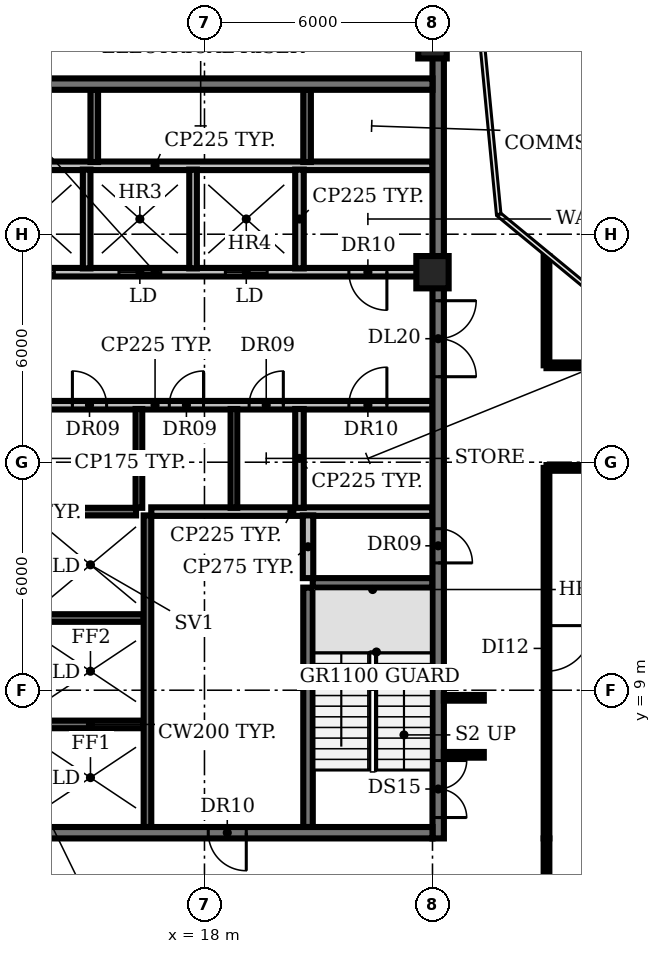
"""IFC4 building model, lengths in metres.
Left out: names, types, materials, properties, quantities, classifications, styles, units other than length and angle.
Written with IfcOpenShell. Run it as: python <this file> out.ifc"""

import sys

from ifc_helpers import new_model, si_unit, direction, frame, frame_2d, origin, origin_2d, place, context, subcontext, project, spatial, rectangle, circle, extrude, element, fill, save


model = new_model("IFC4")
c1 = context("Model", 3, precision=1e-05, world=origin(), true_north=direction((0.0, 1.0)))
c2 = subcontext(c1, "Body", "Model", "MODEL_VIEW")
j1 = project(units=[si_unit("LENGTHUNIT", "METRE"), si_unit("PLANEANGLEUNIT", "RADIAN")], contexts=[c1])
p1 = place(None, origin())
s1 = spatial("IfcSite", under=j1, at=p1, CompositionType="ELEMENT")
p2 = place(p1, origin())
s2 = spatial("IfcBuilding", under=s1, at=p2, CompositionType="ELEMENT")
p3 = place(p2, frame((0.0, 0.0, 310.4)))
s3 = spatial("IfcBuildingStorey", under=s2, at=p3, CompositionType="ELEMENT", Elevation=310.4)
p4 = place(p3, frame((24.0, 20.0, 0.0), z_axis=(0.0, 0.0, 1.0), x_axis=(1.0, 0.0, 0.0)))
e1 = element("IfcColumn", 1, at=p4, inside=s3, PredefinedType="COLUMN", context=c2, shape_type="SweptSolid", body=[
    extrude(circle(Radius=0.425, at=origin_2d()), origin(), (0.0, 0.0, 1.0), 3.9),
])
p5 = place(p3, frame((24.0, 26.0, 0.0), z_axis=(0.0, 0.0, 1.0), x_axis=(1.0, 0.0, 0.0)))
e2 = element("IfcColumn", 2, at=p5, inside=s3, PredefinedType="COLUMN", context=c2, shape_type="SweptSolid", body=[
    extrude(rectangle(XDim=0.75, YDim=0.75, at=origin_2d()), origin(), (0.0, 0.0, 1.0), 3.9),
])
for number, where, z_axis, x_axis in (
    (3, (13.6, 8.1, 0.0), (0.0, 0.0, 1.0), (1.0, 0.0, 0.0)),
    (4, (13.6, 10.9, 0.0), (0.0, 0.0, 1.0), (1.0, 0.0, 0.0)),
):
    element("IfcWall", number, at=place(p3, frame(where, z_axis=z_axis, x_axis=x_axis)), inside=s3, PredefinedType="SHEAR", context=c2, shape_type="SweptSolid", body=[
        extrude(rectangle(XDim=2.8, YDim=0.2, at=frame_2d((1.4, 0.0))), origin(), (0.0, 0.0, 1.0), 3.9),
    ])
p6 = place(p3, frame((20.85, 11.825, 0.0), z_axis=(0.0, 0.0, 1.0), x_axis=(1.0, 0.0, 0.0)))
e5 = element("IfcWall", 5, at=p6, inside=s3, PredefinedType="SHEAR", context=c2, shape_type="SweptSolid", body=[
    extrude(rectangle(XDim=3.15, YDim=0.25, at=frame_2d((1.575, 0.0))), origin(), (0.0, 0.0, 1.0), 3.9),
])
p7 = place(p3, frame((13.75, 13.7, 0.0), z_axis=(0.0, 0.0, 1.0), x_axis=(1.0, 0.0, 0.0)))
e6 = element("IfcWall", 6, at=p7, inside=s3, PredefinedType="SHEAR", context=c2, shape_type="SweptSolid", body=[
    extrude(rectangle(XDim=2.45, YDim=0.2, at=frame_2d((1.225, 0.0))), origin(), (0.0, 0.0, 1.0), 3.9),
])
p8 = place(p3, frame((16.6, 13.7, 0.0), z_axis=(0.0, 0.0, 1.0), x_axis=(1.0, 0.0, 0.0)))
e7 = element("IfcWall", 7, at=p8, inside=s3, PredefinedType="PARTITIONING", context=c2, shape_type="SweptSolid", body=[
    extrude(rectangle(XDim=7.4, YDim=0.225, at=frame_2d((3.7, 0.0))), origin(), (0.0, 0.0, 1.0), 3.9),
])
p9 = place(p3, frame((9.4, 16.5, 0.0), z_axis=(0.0, 0.0, 1.0), x_axis=(1.0, 0.0, 0.0)))
e8 = element("IfcWall", 8, at=p9, inside=s3, PredefinedType="PARTITIONING", context=c2, shape_type="SweptSolid", body=[
    extrude(rectangle(XDim=14.6, YDim=0.225, at=frame_2d((7.3, 0.0))), origin(), (0.0, 0.0, 1.0), 3.9),
])
p10 = place(p9, frame((1.6, 0.0, 0.0)))
e9 = element("IfcOpeningElement", 9, at=p10, cuts=e8, PredefinedType="OPENING", context=c2, shape_type="SweptSolid", body=[
    extrude(rectangle(XDim=1.0, YDim=2.1, at=frame_2d((0.5, 1.05))), frame((0.0, 0.123, 0.0), z_axis=(0.0, -1.0, 0.0), x_axis=(1.0, 0.0, 0.0)), (0.0, 0.0, 1.0), 0.245),
])
p11 = place(p9, frame((5.125, 0.0, 0.0)))
e10 = element("IfcOpeningElement", 10, at=p11, cuts=e8, PredefinedType="OPENING", context=c2, shape_type="SweptSolid", body=[
    extrude(rectangle(XDim=0.9, YDim=2.1, at=frame_2d((0.45, 1.05))), frame((0.0, 0.123, 0.0), z_axis=(0.0, -1.0, 0.0), x_axis=(1.0, 0.0, 0.0)), (0.0, 0.0, 1.0), 0.245),
])
p12 = place(p9, frame((7.675, 0.0, 0.0)))
e11 = element("IfcOpeningElement", 11, at=p12, cuts=e8, PredefinedType="OPENING", context=c2, shape_type="SweptSolid", body=[
    extrude(rectangle(XDim=0.9, YDim=2.1, at=frame_2d((0.45, 1.05))), frame((0.0, 0.123, 0.0), z_axis=(0.0, -1.0, 0.0), x_axis=(1.0, 0.0, 0.0)), (0.0, 0.0, 1.0), 0.245),
])
p13 = place(p9, frame((9.775, 0.0, 0.0)))
e12 = element("IfcOpeningElement", 12, at=p13, cuts=e8, PredefinedType="OPENING", context=c2, shape_type="SweptSolid", body=[
    extrude(rectangle(XDim=0.9, YDim=2.1, at=frame_2d((0.45, 1.05))), frame((0.0, 0.123, 0.0), z_axis=(0.0, -1.0, 0.0), x_axis=(1.0, 0.0, 0.0)), (0.0, 0.0, 1.0), 0.245),
])
p14 = place(p9, frame((12.4, 0.0, 0.0)))
e13 = element("IfcOpeningElement", 13, at=p14, cuts=e8, PredefinedType="OPENING", context=c2, shape_type="SweptSolid", body=[
    extrude(rectangle(XDim=1.0, YDim=2.1, at=frame_2d((0.5, 1.05))), frame((0.0, 0.123, 0.0), z_axis=(0.0, -1.0, 0.0), x_axis=(1.0, 0.0, 0.0)), (0.0, 0.0, 1.0), 0.245),
])
p15 = place(p3, frame((24.0, 20.0, 0.0), z_axis=(0.0, 0.0, 1.0), x_axis=(-1.0, 0.0, 0.0)))
e14 = element("IfcWall", 14, at=p15, inside=s3, PredefinedType="PARTITIONING", context=c2, shape_type="SweptSolid", body=[
    extrude(rectangle(XDim=14.6, YDim=0.225, at=frame_2d((7.3, 0.0))), origin(), (0.0, 0.0, 1.0), 3.9),
])
p16 = place(p15, frame((12.75, 0.0, 0.0)))
e15 = element("IfcOpeningElement", 15, at=p16, cuts=e14, PredefinedType="OPENING", context=c2, shape_type="SweptSolid", body=[
    extrude(rectangle(XDim=1.1, YDim=2.1, at=frame_2d((0.55, 1.05))), frame((0.0, 0.123, 0.0), z_axis=(0.0, -1.0, 0.0), x_axis=(1.0, 0.0, 0.0)), (0.0, 0.0, 1.0), 0.245),
])
p17 = place(p15, frame((9.95, 0.0, 0.0)))
e16 = element("IfcOpeningElement", 16, at=p17, cuts=e14, PredefinedType="OPENING", context=c2, shape_type="SweptSolid", body=[
    extrude(rectangle(XDim=1.1, YDim=2.1, at=frame_2d((0.55, 1.05))), frame((0.0, 0.123, 0.0), z_axis=(0.0, -1.0, 0.0), x_axis=(1.0, 0.0, 0.0)), (0.0, 0.0, 1.0), 0.245),
])
p18 = place(p15, frame((7.15, 0.0, 0.0)))
e17 = element("IfcOpeningElement", 17, at=p18, cuts=e14, PredefinedType="OPENING", context=c2, shape_type="SweptSolid", body=[
    extrude(rectangle(XDim=1.1, YDim=2.1, at=frame_2d((0.55, 1.05))), frame((0.0, 0.123, 0.0), z_axis=(0.0, -1.0, 0.0), x_axis=(1.0, 0.0, 0.0)), (0.0, 0.0, 1.0), 0.245),
])
p19 = place(p15, frame((4.35, 0.0, 0.0)))
e18 = element("IfcOpeningElement", 18, at=p19, cuts=e14, PredefinedType="OPENING", context=c2, shape_type="SweptSolid", body=[
    extrude(rectangle(XDim=1.1, YDim=2.1, at=frame_2d((0.55, 1.05))), frame((0.0, 0.123, 0.0), z_axis=(0.0, -1.0, 0.0), x_axis=(1.0, 0.0, 0.0)), (0.0, 0.0, 1.0), 0.245),
])
p20 = place(p15, frame((1.2, 0.0, 0.0)))
e19 = element("IfcOpeningElement", 19, at=p20, cuts=e14, PredefinedType="OPENING", context=c2, shape_type="SweptSolid", body=[
    extrude(rectangle(XDim=1.0, YDim=2.1, at=frame_2d((0.5, 1.05))), frame((0.0, 0.123, 0.0), z_axis=(0.0, -1.0, 0.0), x_axis=(1.0, 0.0, 0.0)), (0.0, 0.0, 1.0), 0.245),
])
p21 = place(p3, frame((9.4, 22.8, 0.0), z_axis=(0.0, 0.0, 1.0), x_axis=(1.0, 0.0, 0.0)))
e20 = element("IfcWall", 20, at=p21, inside=s3, PredefinedType="PARTITIONING", context=c2, shape_type="SweptSolid", body=[
    extrude(rectangle(XDim=14.6, YDim=0.225, at=frame_2d((7.3, 0.0))), origin(), (0.0, 0.0, 1.0), 3.9),
])
p22 = place(p3, frame((14.9, 20.1, 0.0), z_axis=(0.0, 0.0, 1.0), x_axis=(0.0, 1.0, 0.0)))
e21 = element("IfcWall", 21, at=p22, inside=s3, PredefinedType="SOLIDWALL", context=c2, shape_type="SweptSolid", body=[
    extrude(rectangle(XDim=2.6, YDim=0.2, at=frame_2d((1.3, 0.0))), origin(), (0.0, 0.0, 1.0), 3.9),
])
p23 = place(p3, frame((15.1, 22.9, 0.0), z_axis=(0.0, 0.0, 1.0), x_axis=(0.0, 1.0, 0.0)))
e22 = element("IfcWall", 22, at=p23, inside=s3, PredefinedType="SHEAR", context=c2, shape_type="SweptSolid", body=[
    extrude(rectangle(XDim=1.9, YDim=0.2, at=frame_2d((0.95, 0.0))), origin(), (0.0, 0.0, 1.0), 3.9),
])
p24 = place(p3, frame((16.275, 13.8, 0.0), z_axis=(0.0, 0.0, 1.0), x_axis=(0.0, 1.0, 0.0)))
e23 = element("IfcWall", 23, at=p24, inside=s3, PredefinedType="PARTITIONING", context=c2, shape_type="SweptSolid", body=[
    extrude(rectangle(XDim=2.6, YDim=0.175, at=frame_2d((1.3, 0.0))), origin(), (0.0, 0.0, 1.0), 3.9),
])
p25 = place(p3, frame((16.5, 5.4, 0.0), z_axis=(0.0, 0.0, 1.0), x_axis=(0.0, 1.0, 0.0)))
e24 = element("IfcWall", 24, at=p25, inside=s3, PredefinedType="SHEAR", context=c2, shape_type="SweptSolid", body=[
    extrude(rectangle(XDim=8.2, YDim=0.2, at=frame_2d((4.1, 0.0))), origin(), (0.0, 0.0, 1.0), 3.9),
])
p26 = place(p3, frame((17.7, 20.1, 0.0), z_axis=(0.0, 0.0, 1.0), x_axis=(0.0, 1.0, 0.0)))
e25 = element("IfcWall", 25, at=p26, inside=s3, PredefinedType="SOLIDWALL", context=c2, shape_type="SweptSolid", body=[
    extrude(rectangle(XDim=2.6, YDim=0.2, at=frame_2d((1.3, 0.0))), origin(), (0.0, 0.0, 1.0), 3.9),
])
p27 = place(p3, frame((18.775, 13.8, 0.0), z_axis=(0.0, 0.0, 1.0), x_axis=(0.0, 1.0, 0.0)))
e26 = element("IfcWall", 26, at=p27, inside=s3, PredefinedType="PARTITIONING", context=c2, shape_type="SweptSolid", body=[
    extrude(rectangle(XDim=2.6, YDim=0.175, at=frame_2d((1.3, 0.0))), origin(), (0.0, 0.0, 1.0), 3.9),
])
for number, where, z_axis, x_axis in (
    (27, (20.5, 13.8, 0.0), (0.0, 0.0, 1.0), (0.0, 1.0, 0.0)),
    (28, (20.5, 20.1, 0.0), (0.0, 0.0, 1.0), (0.0, 1.0, 0.0)),
):
    element("IfcWall", number, at=place(p3, frame(where, z_axis=z_axis, x_axis=x_axis)), inside=s3, PredefinedType="PARTITIONING", context=c2, shape_type="SweptSolid", body=[
        extrude(rectangle(XDim=2.6, YDim=0.225, at=frame_2d((1.3, 0.0))), origin(), (0.0, 0.0, 1.0), 3.9),
    ])
p28 = place(p3, frame((20.7, 22.9, 0.0), z_axis=(0.0, 0.0, 1.0), x_axis=(0.0, 1.0, 0.0)))
e29 = element("IfcWall", 29, at=p28, inside=s3, PredefinedType="SHEAR", context=c2, shape_type="SweptSolid", body=[
    extrude(rectangle(XDim=1.9, YDim=0.2, at=frame_2d((0.95, 0.0))), origin(), (0.0, 0.0, 1.0), 3.9),
])
p29 = place(p3, frame((20.725, 5.4, 0.0), z_axis=(0.0, 0.0, 1.0), x_axis=(0.0, 1.0, 0.0)))
e30 = element("IfcWall", 30, at=p29, inside=s3, PredefinedType="SHEAR", context=c2, shape_type="SweptSolid", body=[
    extrude(rectangle(XDim=6.3, YDim=0.25, at=frame_2d((3.15, 0.0))), origin(), (0.0, 0.0, 1.0), 3.9),
])
p30 = place(p3, frame((20.725, 11.95, 0.0), z_axis=(0.0, 0.0, 1.0), x_axis=(0.0, 1.0, 0.0)))
e31 = element("IfcWall", 31, at=p30, inside=s3, PredefinedType="PARTITIONING", context=c2, shape_type="SweptSolid", body=[
    extrude(rectangle(XDim=1.65, YDim=0.275, at=frame_2d((0.825, 0.0))), origin(), (0.0, 0.0, 1.0), 3.9),
])
p31 = place(p3, frame((24.15, 25.655, 0.0), z_axis=(0.0, 0.0, 1.0), x_axis=(0.0, -1.0, 0.0)))
e32 = element("IfcWall", 32, at=p31, inside=s3, PredefinedType="SHEAR", context=c2, shape_type="SweptSolid", body=[
    extrude(rectangle(XDim=20.555, YDim=0.3, at=frame_2d((10.277, 0.0))), origin(), (0.0, 0.0, 1.0), 3.9),
])
p32 = place(p31, frame((18.505, 0.0, 0.0)))
e33 = element("IfcOpeningElement", 33, at=p32, cuts=e32, PredefinedType="OPENING", context=c2, shape_type="SweptSolid", body=[
    extrude(rectangle(XDim=1.5, YDim=2.1, at=frame_2d((0.75, 1.05))), frame((0.0, 0.16, 0.0), z_axis=(0.0, -1.0, 0.0), x_axis=(1.0, 0.0, 0.0)), (0.0, 0.0, 1.0), 0.32),
])
p33 = place(p31, frame((12.405, 0.0, 0.0)))
e34 = element("IfcOpeningElement", 34, at=p33, cuts=e32, PredefinedType="OPENING", context=c2, shape_type="SweptSolid", body=[
    extrude(rectangle(XDim=0.9, YDim=2.1, at=frame_2d((0.45, 1.05))), frame((0.0, 0.16, 0.0), z_axis=(0.0, -1.0, 0.0), x_axis=(1.0, 0.0, 0.0)), (0.0, 0.0, 1.0), 0.32),
])
p34 = place(p31, frame((6.405, 0.0, 0.0)))
e35 = element("IfcOpeningElement", 35, at=p34, cuts=e32, PredefinedType="OPENING", context=c2, shape_type="SweptSolid", body=[
    extrude(rectangle(XDim=2.0, YDim=2.1, at=frame_2d((1.0, 1.05))), frame((0.0, 0.16, 0.0), z_axis=(0.0, -1.0, 0.0), x_axis=(1.0, 0.0, 0.0)), (0.0, 0.0, 1.0), 0.32),
])
p35 = place(p3, frame((24.0, 5.25, 0.0), z_axis=(0.0, 0.0, 1.0), x_axis=(-1.0, 0.0, 0.0)))
e36 = element("IfcWall", 36, at=p35, inside=s3, PredefinedType="SHEAR", context=c2, shape_type="SweptSolid", body=[
    extrude(rectangle(XDim=18.0, YDim=0.3, at=frame_2d((9.0, 0.0))), origin(), (0.0, 0.0, 1.0), 3.9),
])
p36 = place(p35, frame((13.0, 0.0, 0.0)))
e37 = element("IfcOpeningElement", 37, at=p36, cuts=e36, PredefinedType="OPENING", context=c2, shape_type="SweptSolid", body=[
    extrude(rectangle(XDim=1.2, YDim=2.1, at=frame_2d((0.6, 1.05))), frame((0.0, 0.16, 0.0), z_axis=(0.0, -1.0, 0.0), x_axis=(1.0, 0.0, 0.0)), (0.0, 0.0, 1.0), 0.32),
])
p37 = place(p35, frame((4.9, 0.0, 0.0)))
e38 = element("IfcOpeningElement", 38, at=p37, cuts=e36, PredefinedType="OPENING", context=c2, shape_type="SweptSolid", body=[
    extrude(rectangle(XDim=1.0, YDim=2.1, at=frame_2d((0.5, 1.05))), frame((0.0, 0.16, 0.0), z_axis=(0.0, -1.0, 0.0), x_axis=(1.0, 0.0, 0.0)), (0.0, 0.0, 1.0), 0.32),
])
p38 = place(p3, frame((6.0, 24.95, 0.0), z_axis=(0.0, 0.0, 1.0), x_axis=(1.0, 0.0, 0.0)))
e39 = element("IfcWall", 39, at=p38, inside=s3, PredefinedType="SHEAR", context=c2, shape_type="SweptSolid", body=[
    extrude(rectangle(XDim=18.0, YDim=0.3, at=frame_2d((9.0, 0.0))), origin(), (0.0, 0.0, 1.0), 3.9),
])
for number, where, z_axis, x_axis in (
    (40, (24.3, 7.3, 0.0), (0.0, 0.0, 1.0), (1.0, 0.0, 0.0)),
    (41, (24.3, 8.8, 0.0), (0.0, 0.0, 1.0), (1.0, 0.0, 0.0)),
):
    element("IfcWall", number, at=place(p3, frame(where, z_axis=z_axis, x_axis=x_axis)), inside=s3, PredefinedType="PARTITIONING", context=c2, shape_type="SweptSolid", body=[
        extrude(rectangle(XDim=1.05, YDim=0.15, at=frame_2d((0.525, 0.0))), origin(), (0.0, 0.0, 1.0), 2.48),
    ])
p39 = place(p3, frame((27.0, 1.2, 0.0), z_axis=(0.0, 0.0, 1.0), x_axis=(0.0, 1.0, 0.0)))
e42 = element("IfcWall", 42, at=p39, inside=s3, PredefinedType="PARTITIONING", context=c2, shape_type="SweptSolid", body=[
    extrude(rectangle(XDim=3.9, YDim=0.15, at=frame_2d((1.95, 0.0))), origin(), (0.0, 0.0, 1.0), 2.48),
])
p40 = place(p3, frame((27.0, 14.85, 0.0), z_axis=(0.0, 0.0, 1.0), x_axis=(0.0, -1.0, 0.0)))
e43 = element("IfcWall", 43, at=p40, inside=s3, PredefinedType="PARTITIONING", context=c2, shape_type="SweptSolid", body=[
    extrude(rectangle(XDim=9.75, YDim=0.15, at=frame_2d((4.875, 0.0))), origin(), (0.0, 0.0, 1.0), 2.48),
])
p41 = place(p40, frame((4.15, 0.0, 0.0)))
e44 = element("IfcOpeningElement", 44, at=p41, cuts=e43, PredefinedType="OPENING", context=c2, shape_type="SweptSolid", body=[
    extrude(rectangle(XDim=1.2, YDim=2.1, at=frame_2d((0.6, 1.05))), frame((0.0, 0.085, 0.0), z_axis=(0.0, -1.0, 0.0), x_axis=(1.0, 0.0, 0.0)), (0.0, 0.0, 1.0), 0.17),
])
p42 = place(p3, frame((27.0, 14.85, 0.0), z_axis=(0.0, 0.0, 1.0), x_axis=(1.0, 0.0, 0.0)))
e45 = element("IfcWall", 45, at=p42, inside=s3, PredefinedType="PARTITIONING", context=c2, shape_type="SweptSolid", body=[
    extrude(rectangle(XDim=5.473, YDim=0.15, at=frame_2d((2.736, 0.0))), origin(), (0.0, 0.0, 1.0), 2.48),
])
p43 = place(p3, frame((27.0, 17.55, 0.0), z_axis=(0.0, 0.0, 1.0), x_axis=(0.0, 1.0, 0.0)))
e46 = element("IfcWall", 46, at=p43, inside=s3, PredefinedType="PARTITIONING", context=c2, shape_type="SweptSolid", body=[
    extrude(rectangle(XDim=2.87, YDim=0.15, at=frame_2d((1.435, 0.0))), origin(), (0.0, 0.0, 1.0), 2.48),
])
p44 = place(p3, frame((27.0, 17.55, 0.0), z_axis=(0.0, 0.0, 1.0), x_axis=(1.0, 0.0, 0.0)))
e47 = element("IfcWall", 47, at=p44, inside=s3, PredefinedType="PARTITIONING", context=c2, shape_type="SweptSolid", body=[
    extrude(rectangle(XDim=3.48, YDim=0.15, at=frame_2d((1.74, 0.0))), origin(), (0.0, 0.0, 1.0), 2.48),
])
p45 = place(p11, origin())
e48 = element("IfcDoor", 48, at=p45, inside=s3, OperationType="SINGLE_SWING_LEFT", PredefinedType="DOOR", context=c2, shape_type="SweptSolid", body=[
    extrude(rectangle(XDim=0.9, YDim=2.1, at=frame_2d((0.45, 1.05))), frame((0.0, 0.025, 0.0), z_axis=(0.0, -1.0, 0.0), x_axis=(1.0, 0.0, 0.0)), (0.0, 0.0, 1.0), 0.05),
])
fill(e10, e48)
p46 = place(p12, origin())
e49 = element("IfcDoor", 49, at=p46, inside=s3, OperationType="SINGLE_SWING_RIGHT", PredefinedType="DOOR", context=c2, shape_type="SweptSolid", body=[
    extrude(rectangle(XDim=0.9, YDim=2.1, at=frame_2d((0.45, 1.05))), frame((0.0, 0.025, 0.0), z_axis=(0.0, -1.0, 0.0), x_axis=(1.0, 0.0, 0.0)), (0.0, 0.0, 1.0), 0.05),
])
fill(e11, e49)
p47 = place(p13, origin())
e50 = element("IfcDoor", 50, at=p47, inside=s3, OperationType="SINGLE_SWING_RIGHT", PredefinedType="DOOR", context=c2, shape_type="SweptSolid", body=[
    extrude(rectangle(XDim=0.9, YDim=2.1, at=frame_2d((0.45, 1.05))), frame((0.0, 0.025, 0.0), z_axis=(0.0, -1.0, 0.0), x_axis=(1.0, 0.0, 0.0)), (0.0, 0.0, 1.0), 0.05),
])
fill(e12, e50)
p48 = place(p14, origin())
e51 = element("IfcDoor", 51, at=p48, inside=s3, OperationType="SINGLE_SWING_RIGHT", PredefinedType="DOOR", context=c2, shape_type="SweptSolid", body=[
    extrude(rectangle(XDim=1.0, YDim=2.1, at=frame_2d((0.5, 1.05))), frame((0.0, 0.025, 0.0), z_axis=(0.0, -1.0, 0.0), x_axis=(1.0, 0.0, 0.0)), (0.0, 0.0, 1.0), 0.05),
])
fill(e13, e51)
p49 = place(p17, origin())
e52 = element("IfcDoor", 52, at=p49, inside=s3, OperationType="DOUBLE_DOOR_SLIDING", PredefinedType="DOOR", context=c2, shape_type="SweptSolid", body=[
    extrude(rectangle(XDim=1.1, YDim=2.1, at=frame_2d((0.55, 1.05))), frame((0.0, 0.025, 0.0), z_axis=(0.0, -1.0, 0.0), x_axis=(1.0, 0.0, 0.0)), (0.0, 0.0, 1.0), 0.05),
])
fill(e16, e52)
p50 = place(p18, origin())
e53 = element("IfcDoor", 53, at=p50, inside=s3, OperationType="DOUBLE_DOOR_SLIDING", PredefinedType="DOOR", context=c2, shape_type="SweptSolid", body=[
    extrude(rectangle(XDim=1.1, YDim=2.1, at=frame_2d((0.55, 1.05))), frame((0.0, 0.025, 0.0), z_axis=(0.0, -1.0, 0.0), x_axis=(1.0, 0.0, 0.0)), (0.0, 0.0, 1.0), 0.05),
])
fill(e17, e53)
p51 = place(p19, origin())
e54 = element("IfcDoor", 54, at=p51, inside=s3, OperationType="DOUBLE_DOOR_SLIDING", PredefinedType="DOOR", context=c2, shape_type="SweptSolid", body=[
    extrude(rectangle(XDim=1.1, YDim=2.1, at=frame_2d((0.55, 1.05))), frame((0.0, 0.025, 0.0), z_axis=(0.0, -1.0, 0.0), x_axis=(1.0, 0.0, 0.0)), (0.0, 0.0, 1.0), 0.05),
])
fill(e18, e54)
p52 = place(p20, origin())
e55 = element("IfcDoor", 55, at=p52, inside=s3, OperationType="SINGLE_SWING_LEFT", PredefinedType="DOOR", context=c2, shape_type="SweptSolid", body=[
    extrude(rectangle(XDim=1.0, YDim=2.1, at=frame_2d((0.5, 1.05))), frame((0.0, 0.025, 0.0), z_axis=(0.0, -1.0, 0.0), x_axis=(1.0, 0.0, 0.0)), (0.0, 0.0, 1.0), 0.05),
])
fill(e19, e55)
p53 = place(p32, origin())
e56 = element("IfcDoor", 56, at=p53, inside=s3, OperationType="DOUBLE_DOOR_SINGLE_SWING", PredefinedType="DOOR", context=c2, shape_type="SweptSolid", body=[
    extrude(rectangle(XDim=1.5, YDim=2.1, at=frame_2d((0.75, 1.05))), frame((0.0, 0.025, 0.0), z_axis=(0.0, -1.0, 0.0), x_axis=(1.0, 0.0, 0.0)), (0.0, 0.0, 1.0), 0.05),
])
fill(e33, e56)
p54 = place(p33, origin())
e57 = element("IfcDoor", 57, at=p54, inside=s3, OperationType="SINGLE_SWING_RIGHT", PredefinedType="DOOR", context=c2, shape_type="SweptSolid", body=[
    extrude(rectangle(XDim=0.9, YDim=2.1, at=frame_2d((0.45, 1.05))), frame((0.0, 0.025, 0.0), z_axis=(0.0, -1.0, 0.0), x_axis=(1.0, 0.0, 0.0)), (0.0, 0.0, 1.0), 0.05),
])
fill(e34, e57)
p55 = place(p34, origin())
e58 = element("IfcDoor", 58, at=p55, inside=s3, OperationType="DOUBLE_DOOR_SINGLE_SWING", PredefinedType="DOOR", context=c2, shape_type="SweptSolid", body=[
    extrude(rectangle(XDim=2.0, YDim=2.1, at=frame_2d((1.0, 1.05))), frame((0.0, 0.025, 0.0), z_axis=(0.0, -1.0, 0.0), x_axis=(1.0, 0.0, 0.0)), (0.0, 0.0, 1.0), 0.05),
])
fill(e35, e58)
p56 = place(p37, origin())
e59 = element("IfcDoor", 59, at=p56, inside=s3, OperationType="SINGLE_SWING_LEFT", PredefinedType="DOOR", context=c2, shape_type="SweptSolid", body=[
    extrude(rectangle(XDim=1.0, YDim=2.1, at=frame_2d((0.5, 1.05))), frame((0.0, 0.025, 0.0), z_axis=(0.0, -1.0, 0.0), x_axis=(1.0, 0.0, 0.0)), (0.0, 0.0, 1.0), 0.05),
])
fill(e38, e59)
p57 = place(p41, origin())
e60 = element("IfcDoor", 60, at=p57, inside=s3, OperationType="SINGLE_SWING_LEFT", PredefinedType="DOOR", context=c2, shape_type="SweptSolid", body=[
    extrude(rectangle(XDim=1.2, YDim=2.1, at=frame_2d((0.6, 1.05))), frame((0.0, 0.025, 0.0), z_axis=(0.0, -1.0, 0.0), x_axis=(1.0, 0.0, 0.0)), (0.0, 0.0, 1.0), 0.05),
])
fill(e44, e60)
save(model, sys.argv[1])
